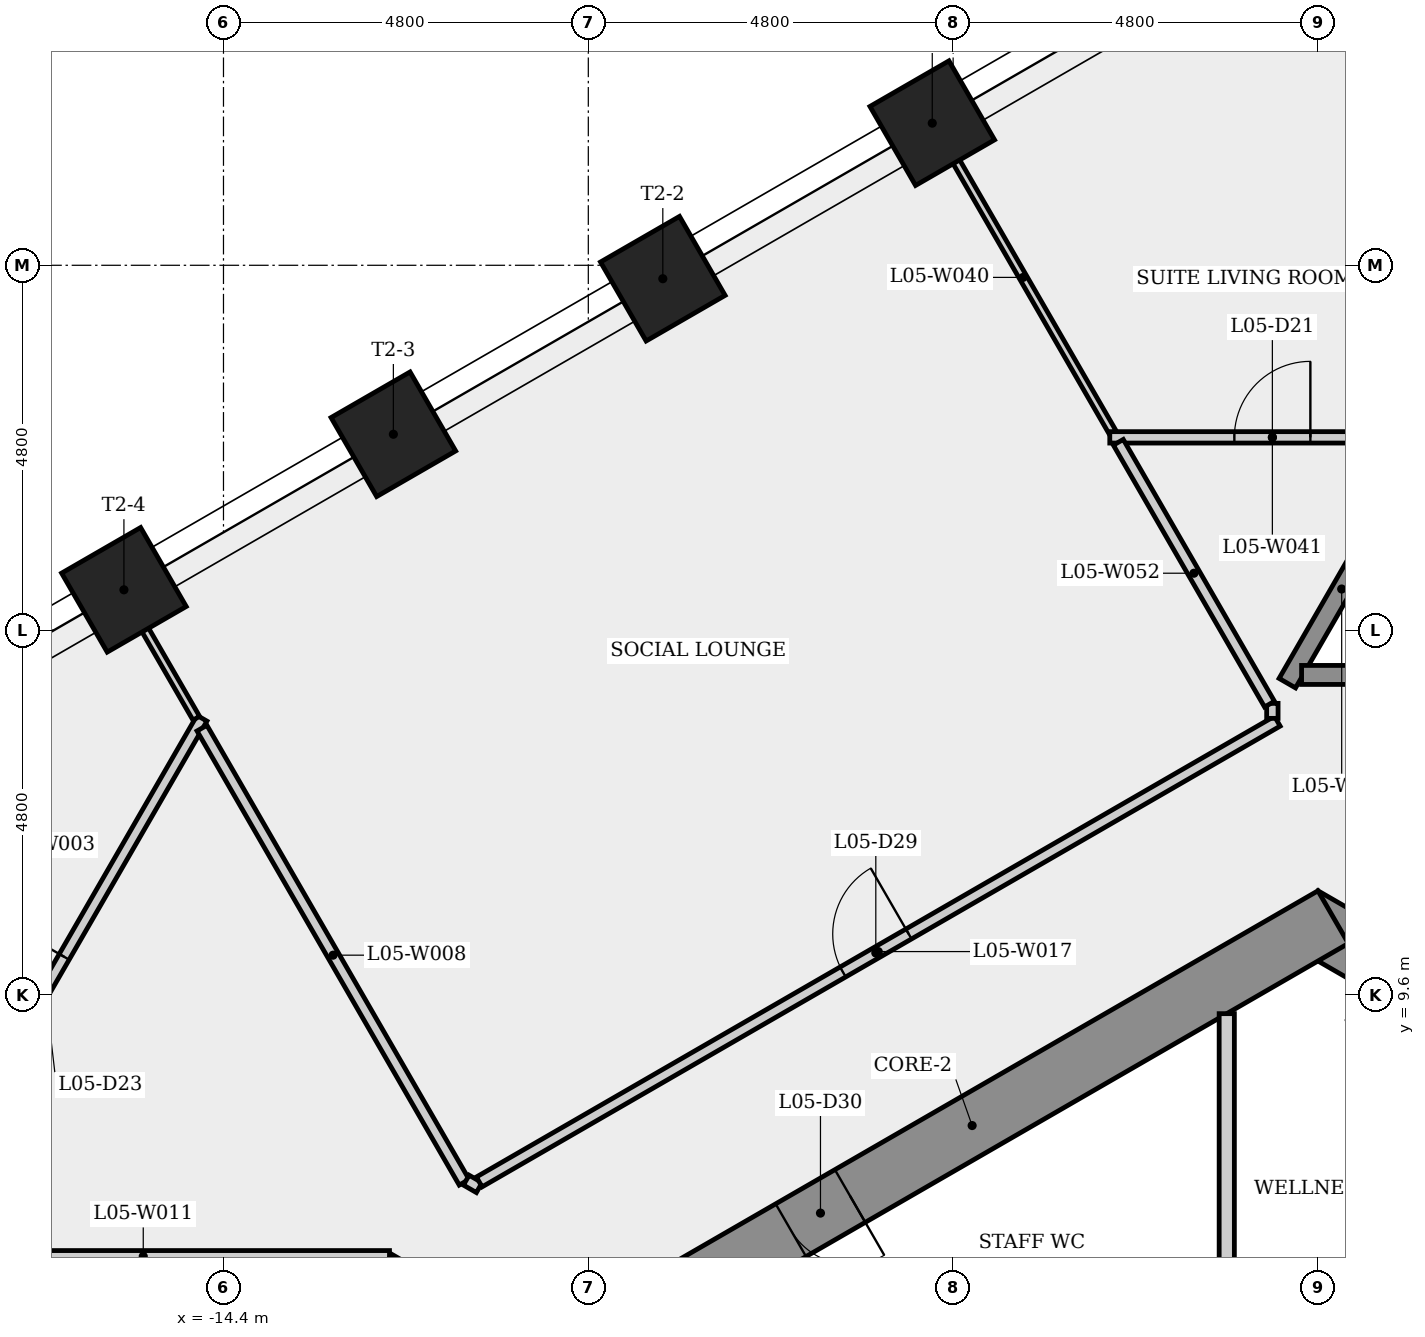
"""IFC4 building model, lengths in metres.
Left out: names, types, materials, properties, quantities, classifications, styles, units other than length and angle.
Written with IfcOpenShell. Run it as: python <this file> out.ifc"""

import sys

from ifc_helpers import new_model, si_unit, direction, frame, frame_2d, origin, origin_2d, place, context, subcontext, project, spatial, rectangle, extrude, element, fill, save


model = new_model("IFC4")
c1 = context("Model", 3, precision=1e-05, world=origin(), true_north=direction((0.0, 1.0)))
c2 = subcontext(c1, "Body", "Model", "MODEL_VIEW")
j1 = project(units=[si_unit("LENGTHUNIT", "METRE"), si_unit("PLANEANGLEUNIT", "RADIAN")], contexts=[c1])
p1 = place(None, origin())
s1 = spatial("IfcSite", under=j1, at=p1, CompositionType="ELEMENT")
p2 = place(p1, origin())
s2 = spatial("IfcBuilding", under=s1, at=p2, CompositionType="ELEMENT")
p3 = place(p2, frame((0.0, 0.0, 25.5)))
s3 = spatial("IfcBuildingStorey", under=s2, at=p3, CompositionType="ELEMENT", Elevation=25.5)
p4 = place(p3, frame((9.3, 5.138, 0.0), z_axis=(0.0, 0.0, 1.0), x_axis=(-0.866023993627, 0.500002442456, 0.0)))
e1 = element("IfcWall", 1, at=p4, inside=s3, PredefinedType="SHEAR", context=c2, shape_type="SweptSolid", body=[
    extrude(rectangle(XDim=10.97, YDim=0.8, at=frame_2d((5.485, 0.0))), origin(), (0.0, 0.0, 1.0), 3.4),
])
p5 = place(p4, frame((8.903, 0.0, 0.0)))
e2 = element("IfcOpeningElement", 2, at=p5, cuts=e1, PredefinedType="OPENING", context=c2, shape_type="SweptSolid", body=[
    extrude(rectangle(XDim=0.9, YDim=2.1, at=frame_2d((0.45, 1.05))), frame((0.0, 0.41, 0.0), z_axis=(0.0, -1.0, 0.0), x_axis=(1.0, 0.0, 0.0)), (0.0, 0.0, 1.0), 0.82),
])
p6 = place(p4, frame((2.269, 0.0, 0.0)))
e3 = element("IfcOpeningElement", 3, at=p6, cuts=e1, PredefinedType="OPENING", context=c2, shape_type="SweptSolid", body=[
    extrude(rectangle(XDim=0.9, YDim=2.1, at=frame_2d((0.45, 1.05))), frame((0.0, 0.41, 0.0), z_axis=(0.0, -1.0, 0.0), x_axis=(1.0, 0.0, 0.0)), (0.0, 0.0, 1.0), 0.82),
])
p7 = place(p3, frame((0.2, 10.623, 0.0), z_axis=(0.0, 0.0, 1.0), x_axis=(-0.866023993627, -0.500002442456, 0.0)))
e4 = element("IfcWall", 4, at=p7, inside=s3, PredefinedType="SHEAR", context=c2, shape_type="SweptSolid", body=[
    extrude(rectangle(XDim=10.97, YDim=0.8, at=frame_2d((5.485, 0.0))), origin(), (0.0, 0.0, 1.0), 3.4),
])
p8 = place(p7, frame((7.339, 0.0, 0.0)))
e5 = element("IfcOpeningElement", 5, at=p8, cuts=e4, PredefinedType="OPENING", context=c2, shape_type="SweptSolid", body=[
    extrude(rectangle(XDim=0.9, YDim=2.1, at=frame_2d((0.45, 1.05))), frame((0.0, 0.41, 0.0), z_axis=(0.0, -1.0, 0.0), x_axis=(1.0, 0.0, 0.0)), (0.0, 0.0, 1.0), 0.82),
])
for number, where, z_axis, x_axis in (
    (6, (-5.075, 21.07, 0.0), (0.0, 0.0, 1.0), (-0.5, 0.866, 0.0)),
    (7, (-8.62, 19.023, 0.0), (0.0, 0.0, 1.0), (-0.5, 0.866, 0.0)),
    (8, (-12.165, 16.977, 0.0), (0.0, 0.0, 1.0), (-0.5, 0.866, 0.0)),
    (9, (-15.71, 14.93, 0.0), (0.0, 0.0, 1.0), (-0.5, 0.866, 0.0)),
):
    element("IfcColumn", number, at=place(p3, frame(where, z_axis=z_axis, x_axis=x_axis)), inside=s3, PredefinedType="COLUMN", context=c2, shape_type="SweptSolid", body=[
        extrude(rectangle(XDim=1.2, YDim=1.2, at=origin_2d()), origin(), (0.0, 0.0, 1.0), 3.4),
    ])
p9 = place(p3, frame((-18.808, 6.096, 0.0), z_axis=(0.0, 0.0, 1.0), x_axis=(0.499999979418, 0.866025415668, 0.0)))
e10 = element("IfcWall", 10, at=p9, inside=s3, PredefinedType="PARTITIONING", context=c2, shape_type="SweptSolid", body=[
    extrude(rectangle(XDim=8.25, YDim=0.15, at=frame_2d((4.125, 0.0))), origin(), (0.0, 0.0, 1.0), 3.05),
])
p10 = place(p9, frame((3.625, 0.0, 0.0)))
e11 = element("IfcOpeningElement", 11, at=p10, cuts=e10, PredefinedType="OPENING", context=c2, shape_type="SweptSolid", body=[
    extrude(rectangle(XDim=1.0, YDim=2.1, at=frame_2d((0.5, 1.05))), frame((0.0, 0.085, 0.0), z_axis=(0.0, -1.0, 0.0), x_axis=(1.0, 0.0, 0.0)), (0.0, 0.0, 1.0), 0.17),
])
p11 = place(p3, frame((-15.728, 14.92, 0.0), z_axis=(0.0, 0.0, 1.0), x_axis=(0.49998396455, -0.866034661658, 0.0)))
e12 = element("IfcWall", 12, at=p11, inside=s3, PredefinedType="PARTITIONING", context=c2, shape_type="SweptSolid", body=[
    extrude(rectangle(XDim=1.939, YDim=0.1, at=frame_2d((0.97, 0.0))), origin(), (0.0, 0.0, 1.0), 3.05),
])
p12 = place(p3, frame((-14.683, 13.11, 0.0), z_axis=(0.0, 0.0, 1.0), x_axis=(0.499998129301, -0.86602648383, 0.0)))
e13 = element("IfcWall", 13, at=p12, inside=s3, PredefinedType="PARTITIONING", context=c2, shape_type="SweptSolid", body=[
    extrude(rectangle(XDim=6.899, YDim=0.15, at=frame_2d((3.45, 0.0))), origin(), (0.0, 0.0, 1.0), 3.05),
])
p13 = place(p3, frame((-12.216, 6.161, 0.0), z_axis=(0.0, 0.0, 1.0), x_axis=(-1.0, 0.0, 0.0)))
e14 = element("IfcWall", 14, at=p13, inside=s3, PredefinedType="PARTITIONING", context=c2, shape_type="SweptSolid", body=[
    extrude(rectangle(XDim=6.479, YDim=0.15, at=frame_2d((3.24, 0.0))), origin(), (0.0, 0.0, 1.0), 3.05),
])
p14 = place(p3, frame((-11.635, 5.782, 0.0), z_axis=(0.0, 0.0, 1.0), x_axis=(-0.866054481515, 0.499949632511, 0.0)))
e15 = element("IfcWall", 15, at=p14, inside=s3, PredefinedType="PARTITIONING", context=c2, shape_type="SweptSolid", body=[
    extrude(rectangle(XDim=0.682, YDim=0.15, at=frame_2d((0.341, 0.0))), origin(), (0.0, 0.0, 1.0), 3.05),
])
p15 = place(p3, frame((-11.206, 7.163, 0.0), z_axis=(0.0, 0.0, 1.0), x_axis=(0.866103179807, -0.499865263774, 0.0)))
e16 = element("IfcWall", 16, at=p15, inside=s3, PredefinedType="PARTITIONING", context=c2, shape_type="SweptSolid", body=[
    extrude(rectangle(XDim=0.197, YDim=0.15, at=frame_2d((0.099, 0.0))), origin(), (0.0, 0.0, 1.0), 3.05),
])
p16 = place(p3, frame((-11.035, 7.139, 0.0), z_axis=(0.0, 0.0, 1.0), x_axis=(0.866022616891, 0.50000482701, 0.0)))
e17 = element("IfcWall", 17, at=p16, inside=s3, PredefinedType="PARTITIONING", context=c2, shape_type="SweptSolid", body=[
    extrude(rectangle(XDim=12.125, YDim=0.15, at=frame_2d((6.062, 0.0))), origin(), (0.0, 0.0, 1.0), 3.05),
])
p17 = place(p16, frame((5.525, 0.0, 0.0)))
e18 = element("IfcOpeningElement", 18, at=p17, cuts=e17, PredefinedType="OPENING", context=c2, shape_type="SweptSolid", body=[
    extrude(rectangle(XDim=1.0, YDim=2.1, at=frame_2d((0.5, 1.05))), frame((0.0, 0.085, 0.0), z_axis=(0.0, -1.0, 0.0), x_axis=(1.0, 0.0, 0.0)), (0.0, 0.0, 1.0), 0.17),
])
p18 = place(p3, frame((-2.702, 17.001, 0.0), z_axis=(0.0, 0.0, 1.0), x_axis=(-0.500002112793, 0.866024183959, 0.0)))
e19 = element("IfcWall", 19, at=p18, inside=s3, PredefinedType="PARTITIONING", context=c2, shape_type="SweptSolid", body=[
    extrude(rectangle(XDim=4.71, YDim=0.1, at=frame_2d((2.355, 0.0))), origin(), (0.0, 0.0, 1.0), 3.05),
])
p19 = place(p3, frame((-2.739, 16.936, 0.0), z_axis=(0.0, 0.0, 1.0), x_axis=(1.0, 0.0, 0.0)))
e20 = element("IfcWall", 20, at=p19, inside=s3, PredefinedType="PARTITIONING", context=c2, shape_type="SweptSolid", body=[
    extrude(rectangle(XDim=4.278, YDim=0.15, at=frame_2d((2.139, 0.0))), origin(), (0.0, 0.0, 1.0), 3.05),
])
p20 = place(p19, frame((1.639, 0.0, 0.0)))
e21 = element("IfcOpeningElement", 21, at=p20, cuts=e20, PredefinedType="OPENING", context=c2, shape_type="SweptSolid", body=[
    extrude(rectangle(XDim=1.0, YDim=2.1, at=frame_2d((0.5, 1.05))), frame((0.0, 0.085, 0.0), z_axis=(0.0, -1.0, 0.0), x_axis=(1.0, 0.0, 0.0)), (0.0, 0.0, 1.0), 0.17),
])
p21 = place(p3, frame((-1.2, 9.353, 0.0), z_axis=(0.0, 0.0, 1.0), x_axis=(0.0, -1.0, 0.0)))
e22 = element("IfcWall", 22, at=p21, inside=s3, PredefinedType="PARTITIONING", context=c2, shape_type="SweptSolid", body=[
    extrude(rectangle(XDim=4.078, YDim=0.2, at=frame_2d((2.039, 0.0))), origin(), (0.0, 0.0, 1.0), 3.05),
])
p22 = place(p3, frame((-0.6, 13.239, 0.0), z_axis=(0.0, 0.0, 1.0), x_axis=(0.0, 1.0, 0.0)))
e23 = element("IfcWall", 23, at=p22, inside=s3, PredefinedType="PARTITIONING", context=c2, shape_type="SweptSolid", body=[
    extrude(rectangle(XDim=0.197, YDim=0.15, at=frame_2d((0.099, 0.0))), origin(), (0.0, 0.0, 1.0), 3.05),
])
p23 = place(p3, frame((-0.637, 13.426, 0.0), z_axis=(0.0, 0.0, 1.0), x_axis=(-0.500046503579, 0.865998553266, 0.0)))
e24 = element("IfcWall", 24, at=p23, inside=s3, PredefinedType="PARTITIONING", context=c2, shape_type="SweptSolid", body=[
    extrude(rectangle(XDim=3.978, YDim=0.15, at=frame_2d((1.989, 0.0))), origin(), (0.0, 0.0, 1.0), 3.05),
])
p24 = place(p3, frame((-0.403, 13.702, 0.0), z_axis=(0.0, 0.0, 1.0), x_axis=(0.499976111731, 0.866039195244, 0.0)))
e25 = element("IfcWall", 25, at=p24, inside=s3, PredefinedType="SHEAR", context=c2, shape_type="SweptSolid", body=[
    extrude(rectangle(XDim=2.861, YDim=0.25, at=frame_2d((1.43, 0.0))), origin(), (0.0, 0.0, 1.0), 3.05),
])
p25 = place(p3, frame((0.475, 13.81, 0.0), z_axis=(0.0, 0.0, 1.0), x_axis=(-1.0, 0.0, 0.0)))
e26 = element("IfcWall", 26, at=p25, inside=s3, PredefinedType="SHEAR", context=c2, shape_type="SweptSolid", body=[
    extrude(rectangle(XDim=0.691, YDim=0.25, at=frame_2d((0.345, 0.0))), origin(), (0.0, 0.0, 1.0), 3.4),
])
p26 = place(p20, origin())
e27 = element("IfcDoor", 27, at=p26, inside=s3, OperationType="SINGLE_SWING_RIGHT", PredefinedType="DOOR", context=c2, shape_type="SweptSolid", body=[
    extrude(rectangle(XDim=1.0, YDim=2.1, at=frame_2d((0.5, 1.05))), frame((0.0, 0.025, 0.0), z_axis=(0.0, -1.0, 0.0), x_axis=(1.0, 0.0, 0.0)), (0.0, 0.0, 1.0), 0.05),
])
fill(e21, e27)
p27 = place(p10, origin())
e28 = element("IfcDoor", 28, at=p27, inside=s3, OperationType="SINGLE_SWING_RIGHT", PredefinedType="DOOR", context=c2, shape_type="SweptSolid", body=[
    extrude(rectangle(XDim=1.0, YDim=2.1, at=frame_2d((0.5, 1.05))), frame((0.0, 0.025, 0.0), z_axis=(0.0, -1.0, 0.0), x_axis=(1.0, 0.0, 0.0)), (0.0, 0.0, 1.0), 0.05),
])
fill(e11, e28)
p28 = place(p17, origin())
e29 = element("IfcDoor", 29, at=p28, inside=s3, OperationType="SINGLE_SWING_RIGHT", PredefinedType="DOOR", context=c2, shape_type="SweptSolid", body=[
    extrude(rectangle(XDim=1.0, YDim=2.1, at=frame_2d((0.5, 1.05))), frame((0.0, 0.025, 0.0), z_axis=(0.0, -1.0, 0.0), x_axis=(1.0, 0.0, 0.0)), (0.0, 0.0, 1.0), 0.05),
])
fill(e18, e29)
p29 = place(p8, origin())
e30 = element("IfcDoor", 30, at=p29, inside=s3, OperationType="SINGLE_SWING_LEFT", PredefinedType="DOOR", context=c2, shape_type="SweptSolid", body=[
    extrude(rectangle(XDim=0.9, YDim=2.1, at=frame_2d((0.45, 1.05))), frame((0.0, 0.025, 0.0), z_axis=(0.0, -1.0, 0.0), x_axis=(1.0, 0.0, 0.0)), (0.0, 0.0, 1.0), 0.05),
])
fill(e5, e30)
save(model, sys.argv[1])
